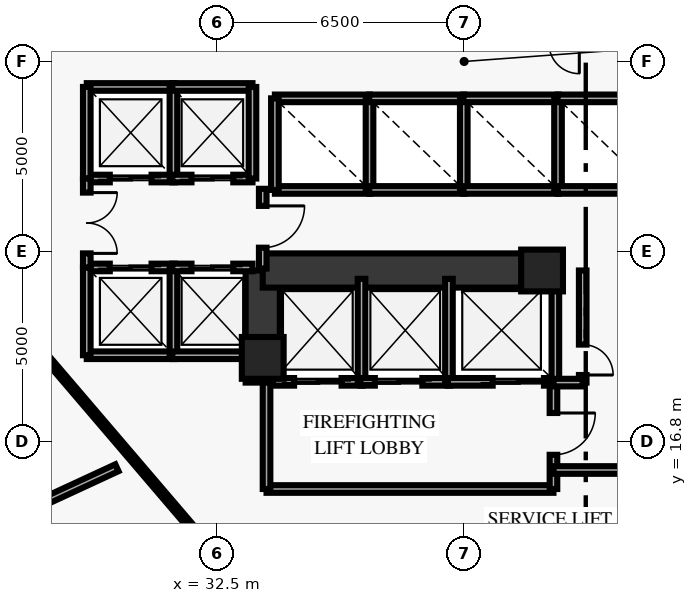
"""IFC4 building model, lengths in metres.
Left out: names, types, materials, properties, quantities, classifications, styles, units other than length and angle.
Written with IfcOpenShell. Run it as: python <this file> out.ifc"""

import sys

from ifc_helpers import new_model, si_unit, direction, frame, frame_2d, origin, origin_2d, place, context, subcontext, project, spatial, rectangle, extrude, element, fill, save


model = new_model("IFC4")
c1 = context("Model", 3, precision=1e-05, world=origin(), true_north=direction((0.0, 1.0)))
c2 = subcontext(c1, "Body", "Model", "MODEL_VIEW")
j1 = project(units=[si_unit("LENGTHUNIT", "METRE"), si_unit("PLANEANGLEUNIT", "RADIAN")], contexts=[c1])
p1 = place(None, origin())
s1 = spatial("IfcSite", under=j1, at=p1, CompositionType="ELEMENT")
p2 = place(p1, origin())
s2 = spatial("IfcBuilding", under=s1, at=p2, CompositionType="ELEMENT")
p3 = place(p2, frame((0.0, 0.0, 11.0)))
s3 = spatial("IfcBuildingStorey", under=s2, at=p3, CompositionType="ELEMENT", Elevation=11.0)
for number, where, z_axis, x_axis in (
    (1, (33.7, 19.0, 0.0), (0.0, 0.0, 1.0), (1.0, 0.0, 0.0)),
    (2, (41.05, 21.3, 0.0), (0.0, 0.0, 1.0), (1.0, 0.0, 0.0)),
):
    element("IfcColumn", number, at=place(p3, frame(where, z_axis=z_axis, x_axis=x_axis)), inside=s3, PredefinedType="PILASTER", context=c2, shape_type="SweptSolid", body=[
        extrude(rectangle(XDim=1.1, YDim=1.1, at=origin_2d()), origin(), (0.0, 0.0, 1.0), 4.7),
    ])
p4 = place(p3, frame((33.7, 18.35, 0.0), z_axis=(0.0, 0.0, 1.0), x_axis=(0.0, 1.0, 0.0)))
e3 = element("IfcWall", 3, at=p4, inside=s3, PredefinedType="SHEAR", context=c2, shape_type="SweptSolid", body=[
    extrude(rectangle(XDim=2.95, YDim=0.9, at=frame_2d((1.475, 0.0))), origin(), (0.0, 0.0, 1.0), 4.7),
])
p5 = place(p3, frame((33.7, 21.3, 0.0), z_axis=(0.0, 0.0, 1.0), x_axis=(1.0, 0.0, 0.0)))
e4 = element("IfcWall", 4, at=p5, inside=s3, PredefinedType="SHEAR", context=c2, shape_type="SweptSolid", body=[
    extrude(rectangle(XDim=7.55, YDim=0.9, at=frame_2d((3.775, 0.0))), origin(), (0.0, 0.0, 1.0), 4.7),
])
p6 = place(p3, frame((29.07, 23.72, 0.0), z_axis=(0.0, 0.0, 1.0), x_axis=(1.0, 0.0, 0.0)))
e5 = element("IfcWall", 5, at=p6, inside=s3, PredefinedType="SOLIDWALL", context=c2, shape_type="SweptSolid", body=[
    extrude(rectangle(XDim=2.31, YDim=0.2, at=frame_2d((1.155, 0.0))), origin(), (0.0, 0.0, 1.0), 4.7),
])
p7 = place(p6, frame((0.605, 0.0, 0.0)))
e6 = element("IfcOpeningElement", 6, at=p7, cuts=e5, PredefinedType="OPENING", context=c2, shape_type="SweptSolid", body=[
    extrude(rectangle(XDim=1.1, YDim=2.15, at=frame_2d((0.55, 1.075))), frame((0.0, 0.11, 0.0), z_axis=(0.0, -1.0, 0.0), x_axis=(1.0, 0.0, 0.0)), (0.0, 0.0, 1.0), 0.22),
])
p8 = place(p3, frame((29.07, 26.13, 0.0), z_axis=(0.0, 0.0, 1.0), x_axis=(1.0, 0.0, 0.0)))
e7 = element("IfcWall", 7, at=p8, inside=s3, PredefinedType="SOLIDWALL", context=c2, shape_type="SweptSolid", body=[
    extrude(rectangle(XDim=2.31, YDim=0.2, at=frame_2d((1.155, 0.0))), origin(), (0.0, 0.0, 1.0), 4.7),
])
for number, where, z_axis, x_axis in (
    (8, (29.07, 23.72, 0.0), (0.0, 0.0, 1.0), (0.0, 1.0, 0.0)),
    (9, (31.35, 23.72, 0.0), (0.0, 0.0, 1.0), (0.0, 1.0, 0.0)),
):
    element("IfcWall", number, at=place(p3, frame(where, z_axis=z_axis, x_axis=x_axis)), inside=s3, PredefinedType="SOLIDWALL", context=c2, shape_type="SweptSolid", body=[
        extrude(rectangle(XDim=2.41, YDim=0.2, at=frame_2d((1.205, 0.0))), origin(), (0.0, 0.0, 1.0), 4.7),
    ])
p9 = place(p3, frame((31.32, 23.72, 0.0), z_axis=(0.0, 0.0, 1.0), x_axis=(1.0, 0.0, 0.0)))
e10 = element("IfcWall", 10, at=p9, inside=s3, PredefinedType="SOLIDWALL", context=c2, shape_type="SweptSolid", body=[
    extrude(rectangle(XDim=2.11, YDim=0.2, at=frame_2d((1.055, 0.0))), origin(), (0.0, 0.0, 1.0), 4.7),
])
p10 = place(p9, frame((0.505, 0.0, 0.0)))
e11 = element("IfcOpeningElement", 11, at=p10, cuts=e10, PredefinedType="OPENING", context=c2, shape_type="SweptSolid", body=[
    extrude(rectangle(XDim=1.1, YDim=2.15, at=frame_2d((0.55, 1.075))), frame((0.0, 0.11, 0.0), z_axis=(0.0, -1.0, 0.0), x_axis=(1.0, 0.0, 0.0)), (0.0, 0.0, 1.0), 0.22),
])
p11 = place(p3, frame((31.32, 26.13, 0.0), z_axis=(0.0, 0.0, 1.0), x_axis=(1.0, 0.0, 0.0)))
e12 = element("IfcWall", 12, at=p11, inside=s3, PredefinedType="SOLIDWALL", context=c2, shape_type="SweptSolid", body=[
    extrude(rectangle(XDim=2.11, YDim=0.2, at=frame_2d((1.055, 0.0))), origin(), (0.0, 0.0, 1.0), 4.7),
])
p12 = place(p3, frame((33.43, 23.72, 0.0), z_axis=(0.0, 0.0, 1.0), x_axis=(0.0, 1.0, 0.0)))
e13 = element("IfcWall", 13, at=p12, inside=s3, PredefinedType="SOLIDWALL", context=c2, shape_type="SweptSolid", body=[
    extrude(rectangle(XDim=2.41, YDim=0.2, at=frame_2d((1.205, 0.0))), origin(), (0.0, 0.0, 1.0), 4.7),
])
p13 = place(p3, frame((29.07, 19.07, 0.0), z_axis=(0.0, 0.0, 1.0), x_axis=(1.0, 0.0, 0.0)))
e14 = element("IfcWall", 14, at=p13, inside=s3, PredefinedType="SOLIDWALL", context=c2, shape_type="SweptSolid", body=[
    extrude(rectangle(XDim=2.31, YDim=0.2, at=frame_2d((1.155, 0.0))), origin(), (0.0, 0.0, 1.0), 4.7),
])
p14 = place(p3, frame((29.07, 21.38, 0.0), z_axis=(0.0, 0.0, 1.0), x_axis=(1.0, 0.0, 0.0)))
e15 = element("IfcWall", 15, at=p14, inside=s3, PredefinedType="SOLIDWALL", context=c2, shape_type="SweptSolid", body=[
    extrude(rectangle(XDim=2.31, YDim=0.2, at=frame_2d((1.155, 0.0))), origin(), (0.0, 0.0, 1.0), 4.7),
])
p15 = place(p14, frame((0.605, 0.0, 0.0)))
e16 = element("IfcOpeningElement", 16, at=p15, cuts=e15, PredefinedType="OPENING", context=c2, shape_type="SweptSolid", body=[
    extrude(rectangle(XDim=1.1, YDim=2.15, at=frame_2d((0.55, 1.075))), frame((0.0, 0.11, 0.0), z_axis=(0.0, -1.0, 0.0), x_axis=(1.0, 0.0, 0.0)), (0.0, 0.0, 1.0), 0.22),
])
for number, where, z_axis, x_axis in (
    (17, (29.07, 19.07, 0.0), (0.0, 0.0, 1.0), (0.0, 1.0, 0.0)),
    (18, (31.35, 19.07, 0.0), (0.0, 0.0, 1.0), (0.0, 1.0, 0.0)),
):
    element("IfcWall", number, at=place(p3, frame(where, z_axis=z_axis, x_axis=x_axis)), inside=s3, PredefinedType="SOLIDWALL", context=c2, shape_type="SweptSolid", body=[
        extrude(rectangle(XDim=2.31, YDim=0.2, at=frame_2d((1.155, 0.0))), origin(), (0.0, 0.0, 1.0), 4.7),
    ])
p16 = place(p3, frame((31.32, 19.07, 0.0), z_axis=(0.0, 0.0, 1.0), x_axis=(1.0, 0.0, 0.0)))
e19 = element("IfcWall", 19, at=p16, inside=s3, PredefinedType="SOLIDWALL", context=c2, shape_type="SweptSolid", body=[
    extrude(rectangle(XDim=2.11, YDim=0.2, at=frame_2d((1.055, 0.0))), origin(), (0.0, 0.0, 1.0), 4.7),
])
p17 = place(p3, frame((31.32, 21.38, 0.0), z_axis=(0.0, 0.0, 1.0), x_axis=(1.0, 0.0, 0.0)))
e20 = element("IfcWall", 20, at=p17, inside=s3, PredefinedType="SOLIDWALL", context=c2, shape_type="SweptSolid", body=[
    extrude(rectangle(XDim=2.11, YDim=0.2, at=frame_2d((1.055, 0.0))), origin(), (0.0, 0.0, 1.0), 4.7),
])
p18 = place(p17, frame((0.505, 0.0, 0.0)))
e21 = element("IfcOpeningElement", 21, at=p18, cuts=e20, PredefinedType="OPENING", context=c2, shape_type="SweptSolid", body=[
    extrude(rectangle(XDim=1.1, YDim=2.15, at=frame_2d((0.55, 1.075))), frame((0.0, 0.11, 0.0), z_axis=(0.0, -1.0, 0.0), x_axis=(1.0, 0.0, 0.0)), (0.0, 0.0, 1.0), 0.22),
])
for number, where, z_axis, x_axis in (
    (22, (34.02, 23.42, 0.0), (0.0, 0.0, 1.0), (1.0, 0.0, 0.0)),
    (23, (34.02, 25.83, 0.0), (0.0, 0.0, 1.0), (1.0, 0.0, 0.0)),
):
    element("IfcWall", number, at=place(p3, frame(where, z_axis=z_axis, x_axis=x_axis)), inside=s3, PredefinedType="SOLIDWALL", context=c2, shape_type="SweptSolid", body=[
        extrude(rectangle(XDim=2.5, YDim=0.2, at=frame_2d((1.25, 0.0))), origin(), (0.0, 0.0, 1.0), 4.7),
    ])
for number, where, z_axis, x_axis in (
    (24, (34.02, 23.42, 0.0), (0.0, 0.0, 1.0), (0.0, 1.0, 0.0)),
    (25, (36.51, 23.42, 0.0), (0.0, 0.0, 1.0), (0.0, 1.0, 0.0)),
):
    element("IfcWall", number, at=place(p3, frame(where, z_axis=z_axis, x_axis=x_axis)), inside=s3, PredefinedType="SOLIDWALL", context=c2, shape_type="SweptSolid", body=[
        extrude(rectangle(XDim=2.41, YDim=0.2, at=frame_2d((1.205, 0.0))), origin(), (0.0, 0.0, 1.0), 4.7),
    ])
for number, where, z_axis, x_axis in (
    (26, (36.5, 23.42, 0.0), (0.0, 0.0, 1.0), (1.0, 0.0, 0.0)),
    (27, (36.5, 25.83, 0.0), (0.0, 0.0, 1.0), (1.0, 0.0, 0.0)),
):
    element("IfcWall", number, at=place(p3, frame(where, z_axis=z_axis, x_axis=x_axis)), inside=s3, PredefinedType="SOLIDWALL", context=c2, shape_type="SweptSolid", body=[
        extrude(rectangle(XDim=2.5, YDim=0.2, at=frame_2d((1.25, 0.0))), origin(), (0.0, 0.0, 1.0), 4.7),
    ])
p19 = place(p3, frame((38.99, 23.42, 0.0), z_axis=(0.0, 0.0, 1.0), x_axis=(0.0, 1.0, 0.0)))
e28 = element("IfcWall", 28, at=p19, inside=s3, PredefinedType="SOLIDWALL", context=c2, shape_type="SweptSolid", body=[
    extrude(rectangle(XDim=2.41, YDim=0.2, at=frame_2d((1.205, 0.0))), origin(), (0.0, 0.0, 1.0), 4.7),
])
for number, where, z_axis, x_axis in (
    (29, (38.98, 23.42, 0.0), (0.0, 0.0, 1.0), (1.0, 0.0, 0.0)),
    (30, (38.98, 25.83, 0.0), (0.0, 0.0, 1.0), (1.0, 0.0, 0.0)),
):
    element("IfcWall", number, at=place(p3, frame(where, z_axis=z_axis, x_axis=x_axis)), inside=s3, PredefinedType="SOLIDWALL", context=c2, shape_type="SweptSolid", body=[
        extrude(rectangle(XDim=2.5, YDim=0.2, at=frame_2d((1.25, 0.0))), origin(), (0.0, 0.0, 1.0), 4.7),
    ])
p20 = place(p3, frame((41.47, 23.42, 0.0), z_axis=(0.0, 0.0, 1.0), x_axis=(0.0, 1.0, 0.0)))
e31 = element("IfcWall", 31, at=p20, inside=s3, PredefinedType="SOLIDWALL", context=c2, shape_type="SweptSolid", body=[
    extrude(rectangle(XDim=2.41, YDim=0.2, at=frame_2d((1.205, 0.0))), origin(), (0.0, 0.0, 1.0), 4.7),
])
for number, where, z_axis, x_axis in (
    (32, (41.46, 23.42, 0.0), (0.0, 0.0, 1.0), (1.0, 0.0, 0.0)),
    (33, (41.46, 25.83, 0.0), (0.0, 0.0, 1.0), (1.0, 0.0, 0.0)),
):
    element("IfcWall", number, at=place(p3, frame(where, z_axis=z_axis, x_axis=x_axis)), inside=s3, PredefinedType="SOLIDWALL", context=c2, shape_type="SweptSolid", body=[
        extrude(rectangle(XDim=2.5, YDim=0.2, at=frame_2d((1.25, 0.0))), origin(), (0.0, 0.0, 1.0), 4.7),
    ])
p21 = place(p3, frame((33.97, 18.37, 0.0), z_axis=(0.0, 0.0, 1.0), x_axis=(1.0, 0.0, 0.0)))
e34 = element("IfcWall", 34, at=p21, inside=s3, PredefinedType="SOLIDWALL", context=c2, shape_type="SweptSolid", body=[
    extrude(rectangle(XDim=2.36, YDim=0.2, at=frame_2d((1.18, 0.0))), origin(), (0.0, 0.0, 1.0), 4.7),
])
p22 = place(p21, frame((0.555, 0.0, 0.0)))
e35 = element("IfcOpeningElement", 35, at=p22, cuts=e34, PredefinedType="OPENING", context=c2, shape_type="SweptSolid", body=[
    extrude(rectangle(XDim=1.25, YDim=2.2, at=frame_2d((0.625, 1.1))), frame((0.0, 0.11, 0.0), z_axis=(0.0, -1.0, 0.0), x_axis=(1.0, 0.0, 0.0)), (0.0, 0.0, 1.0), 0.22),
])
p23 = place(p3, frame((36.3, 18.37, 0.0), z_axis=(0.0, 0.0, 1.0), x_axis=(0.0, 1.0, 0.0)))
e36 = element("IfcWall", 36, at=p23, inside=s3, PredefinedType="SOLIDWALL", context=c2, shape_type="SweptSolid", body=[
    extrude(rectangle(XDim=2.71, YDim=0.2, at=frame_2d((1.355, 0.0))), origin(), (0.0, 0.0, 1.0), 4.7),
])
p24 = place(p3, frame((36.27, 18.37, 0.0), z_axis=(0.0, 0.0, 1.0), x_axis=(1.0, 0.0, 0.0)))
e37 = element("IfcWall", 37, at=p24, inside=s3, PredefinedType="SOLIDWALL", context=c2, shape_type="SweptSolid", body=[
    extrude(rectangle(XDim=2.36, YDim=0.2, at=frame_2d((1.18, 0.0))), origin(), (0.0, 0.0, 1.0), 4.7),
])
p25 = place(p24, frame((0.38, 0.0, 0.0)))
e38 = element("IfcOpeningElement", 38, at=p25, cuts=e37, PredefinedType="OPENING", context=c2, shape_type="SweptSolid", body=[
    extrude(rectangle(XDim=1.25, YDim=2.2, at=frame_2d((0.625, 1.1))), frame((0.0, 0.11, 0.0), z_axis=(0.0, -1.0, 0.0), x_axis=(1.0, 0.0, 0.0)), (0.0, 0.0, 1.0), 0.22),
])
p26 = place(p3, frame((38.6, 18.37, 0.0), z_axis=(0.0, 0.0, 1.0), x_axis=(0.0, 1.0, 0.0)))
e39 = element("IfcWall", 39, at=p26, inside=s3, PredefinedType="SOLIDWALL", context=c2, shape_type="SweptSolid", body=[
    extrude(rectangle(XDim=2.71, YDim=0.2, at=frame_2d((1.355, 0.0))), origin(), (0.0, 0.0, 1.0), 4.7),
])
p27 = place(p3, frame((38.57, 18.37, 0.0), z_axis=(0.0, 0.0, 1.0), x_axis=(1.0, 0.0, 0.0)))
e40 = element("IfcWall", 40, at=p27, inside=s3, PredefinedType="SOLIDWALL", context=c2, shape_type="SweptSolid", body=[
    extrude(rectangle(XDim=2.83, YDim=0.2, at=frame_2d((1.415, 0.0))), origin(), (0.0, 0.0, 1.0), 4.7),
])
p28 = place(p27, frame((1.18, 0.0, 0.0)))
e41 = element("IfcOpeningElement", 41, at=p28, cuts=e40, PredefinedType="OPENING", context=c2, shape_type="SweptSolid", body=[
    extrude(rectangle(XDim=1.35, YDim=2.18, at=frame_2d((0.675, 1.09))), frame((0.0, 0.11, 0.0), z_axis=(0.0, -1.0, 0.0), x_axis=(1.0, 0.0, 0.0)), (0.0, 0.0, 1.0), 0.22),
])
p29 = place(p3, frame((41.4, 18.37, 0.0), z_axis=(0.0, 0.0, 1.0), x_axis=(0.0, 1.0, 0.0)))
e42 = element("IfcWall", 42, at=p29, inside=s3, PredefinedType="SOLIDWALL", context=c2, shape_type="SweptSolid", body=[
    extrude(rectangle(XDim=2.71, YDim=0.2, at=frame_2d((1.355, 0.0))), origin(), (0.0, 0.0, 1.0), 4.7),
])
p30 = place(p3, frame((29.07, 21.38, 0.0), z_axis=(0.0, 0.0, 1.0), x_axis=(0.0, 1.0, 0.0)))
e43 = element("IfcWall", 43, at=p30, inside=s3, PredefinedType="SOLIDWALL", context=c2, shape_type="SweptSolid", body=[
    extrude(rectangle(XDim=2.34, YDim=0.2, at=frame_2d((1.17, 0.0))), origin(), (0.0, 0.0, 1.0), 4.7),
])
p31 = place(p30, frame((0.37, 0.0, 0.0)))
e44 = element("IfcOpeningElement", 44, at=p31, cuts=e43, PredefinedType="OPENING", context=c2, shape_type="SweptSolid", body=[
    extrude(rectangle(XDim=1.6, YDim=2.2, at=frame_2d((0.8, 1.1))), frame((0.0, 0.11, 0.0), z_axis=(0.0, -1.0, 0.0), x_axis=(1.0, 0.0, 0.0)), (0.0, 0.0, 1.0), 0.22),
])
p32 = place(p3, frame((33.7, 21.35, 0.0), z_axis=(0.0, 0.0, 1.0), x_axis=(0.0, 1.0, 0.0)))
e45 = element("IfcWall", 45, at=p32, inside=s3, PredefinedType="SOLIDWALL", context=c2, shape_type="SweptSolid", body=[
    extrude(rectangle(XDim=2.1, YDim=0.2, at=frame_2d((1.05, 0.0))), origin(), (0.0, 0.0, 1.0), 3.92),
])
p33 = place(p32, frame((0.55, 0.0, 0.0)))
e46 = element("IfcOpeningElement", 46, at=p33, cuts=e45, PredefinedType="OPENING", context=c2, shape_type="SweptSolid", body=[
    extrude(rectangle(XDim=1.1, YDim=2.15, at=frame_2d((0.55, 1.075))), frame((0.0, 0.11, 0.0), z_axis=(0.0, -1.0, 0.0), x_axis=(1.0, 0.0, 0.0)), (0.0, 0.0, 1.0), 0.22),
])
p34 = place(p3, frame((33.8, 15.55, 0.0), z_axis=(0.0, 0.0, 1.0), x_axis=(1.0, 0.0, 0.0)))
e47 = element("IfcWall", 47, at=p34, inside=s3, PredefinedType="SOLIDWALL", context=c2, shape_type="SweptSolid", body=[
    extrude(rectangle(XDim=7.55, YDim=0.2, at=frame_2d((3.775, 0.0))), origin(), (0.0, 0.0, 1.0), 4.7),
])
p35 = place(p3, frame((33.8, 15.55, 0.0), z_axis=(0.0, 0.0, 1.0), x_axis=(0.0, 1.0, 0.0)))
e48 = element("IfcWall", 48, at=p35, inside=s3, PredefinedType="SOLIDWALL", context=c2, shape_type="SweptSolid", body=[
    extrude(rectangle(XDim=2.8, YDim=0.2, at=frame_2d((1.4, 0.0))), origin(), (0.0, 0.0, 1.0), 4.7),
])
p36 = place(p3, frame((41.35, 15.55, 0.0), z_axis=(0.0, 0.0, 1.0), x_axis=(0.0, 1.0, 0.0)))
e49 = element("IfcWall", 49, at=p36, inside=s3, PredefinedType="SOLIDWALL", context=c2, shape_type="SweptSolid", body=[
    extrude(rectangle(XDim=2.8, YDim=0.2, at=frame_2d((1.4, 0.0))), origin(), (0.0, 0.0, 1.0), 4.7),
])
p37 = place(p36, frame((0.9, 0.0, 0.0)))
e50 = element("IfcOpeningElement", 50, at=p37, cuts=e49, PredefinedType="OPENING", context=c2, shape_type="SweptSolid", body=[
    extrude(rectangle(XDim=1.1, YDim=2.15, at=frame_2d((0.55, 1.075))), frame((0.0, 0.11, 0.0), z_axis=(0.0, -1.0, 0.0), x_axis=(1.0, 0.0, 0.0)), (0.0, 0.0, 1.0), 0.22),
])
p38 = place(p3, frame((41.35, 16.05, 0.0), z_axis=(0.0, 0.0, 1.0), x_axis=(1.0, 0.0, 0.0)))
e51 = element("IfcWall", 51, at=p38, inside=s3, PredefinedType="SOLIDWALL", context=c2, shape_type="SweptSolid", body=[
    extrude(rectangle(XDim=4.5, YDim=0.2, at=frame_2d((2.25, 0.0))), origin(), (0.0, 0.0, 1.0), 4.7),
])
p39 = place(p3, frame((42.12, 18.35, 0.0), z_axis=(0.0, 0.0, 1.0), x_axis=(0.0, 1.0, 0.0)))
e52 = element("IfcWall", 52, at=p39, inside=s3, PredefinedType="SOLIDWALL", context=c2, shape_type="SweptSolid", body=[
    extrude(rectangle(XDim=2.95, YDim=0.2, at=frame_2d((1.475, 0.0))), origin(), (0.0, 0.0, 1.0), 4.7),
])
p40 = place(p39, frame((0.2, 0.0, 0.0)))
e53 = element("IfcOpeningElement", 53, at=p40, cuts=e52, PredefinedType="OPENING", context=c2, shape_type="SweptSolid", body=[
    extrude(rectangle(XDim=0.8, YDim=2.05, at=frame_2d((0.4, 1.025))), frame((0.0, 0.11, 0.0), z_axis=(0.0, -1.0, 0.0), x_axis=(1.0, 0.0, 0.0)), (0.0, 0.0, 1.0), 0.22),
])
p41 = place(p3, frame((41.35, 18.35, 0.0), z_axis=(0.0, 0.0, 1.0), x_axis=(1.0, 0.0, 0.0)))
e54 = element("IfcWall", 54, at=p41, inside=s3, PredefinedType="SOLIDWALL", context=c2, shape_type="SweptSolid", body=[
    extrude(rectangle(XDim=0.77, YDim=0.2, at=frame_2d((0.385, 0.0))), origin(), (0.0, 0.0, 1.0), 4.7),
])
p42 = place(p3, frame((27.811, 19.24, 0.0), z_axis=(0.0, 0.0, 1.0), x_axis=(0.649652680018, -0.760231145998, 0.0)))
e55 = element("IfcWall", 55, at=p42, inside=s3, PredefinedType="PARTITIONING", context=c2, shape_type="SweptSolid", body=[
    extrude(rectangle(XDim=7.279, YDim=0.16, at=frame_2d((3.64, 0.0))), origin(), (0.0, 0.0, 1.0), 4.7),
])
p43 = place(p3, frame((29.864, 16.109, 0.0), z_axis=(0.0, 0.0, 1.0), x_axis=(-0.907520382507, -0.420008041988, 0.0)))
e56 = element("IfcWall", 56, at=p43, inside=s3, PredefinedType="PARTITIONING", context=c2, shape_type="SweptSolid", body=[
    extrude(rectangle(XDim=10.152, YDim=0.2, at=frame_2d((5.076, 0.0))), origin(), (0.0, 0.0, 1.0), 4.7),
])
p44 = place(p7, origin())
e57 = element("IfcDoor", 57, at=p44, inside=s3, OperationType="DOUBLE_DOOR_SLIDING", PredefinedType="DOOR", context=c2, shape_type="SweptSolid", body=[
    extrude(rectangle(XDim=1.1, YDim=2.15, at=frame_2d((0.55, 1.075))), frame((0.0, 0.025, 0.0), z_axis=(0.0, -1.0, 0.0), x_axis=(1.0, 0.0, 0.0)), (0.0, 0.0, 1.0), 0.05),
])
fill(e6, e57)
p45 = place(p10, origin())
e58 = element("IfcDoor", 58, at=p45, inside=s3, OperationType="DOUBLE_DOOR_SLIDING", PredefinedType="DOOR", context=c2, shape_type="SweptSolid", body=[
    extrude(rectangle(XDim=1.1, YDim=2.15, at=frame_2d((0.55, 1.075))), frame((0.0, 0.025, 0.0), z_axis=(0.0, -1.0, 0.0), x_axis=(1.0, 0.0, 0.0)), (0.0, 0.0, 1.0), 0.05),
])
fill(e11, e58)
p46 = place(p15, origin())
e59 = element("IfcDoor", 59, at=p46, inside=s3, OperationType="DOUBLE_DOOR_SLIDING", PredefinedType="DOOR", context=c2, shape_type="SweptSolid", body=[
    extrude(rectangle(XDim=1.1, YDim=2.15, at=frame_2d((0.55, 1.075))), frame((0.0, 0.025, 0.0), z_axis=(0.0, -1.0, 0.0), x_axis=(1.0, 0.0, 0.0)), (0.0, 0.0, 1.0), 0.05),
])
fill(e16, e59)
p47 = place(p18, origin())
e60 = element("IfcDoor", 60, at=p47, inside=s3, OperationType="DOUBLE_DOOR_SLIDING", PredefinedType="DOOR", context=c2, shape_type="SweptSolid", body=[
    extrude(rectangle(XDim=1.1, YDim=2.15, at=frame_2d((0.55, 1.075))), frame((0.0, 0.025, 0.0), z_axis=(0.0, -1.0, 0.0), x_axis=(1.0, 0.0, 0.0)), (0.0, 0.0, 1.0), 0.05),
])
fill(e21, e60)
p48 = place(p22, origin())
e61 = element("IfcDoor", 61, at=p48, inside=s3, OperationType="DOUBLE_DOOR_SLIDING", PredefinedType="DOOR", context=c2, shape_type="SweptSolid", body=[
    extrude(rectangle(XDim=1.25, YDim=2.2, at=frame_2d((0.625, 1.1))), frame((0.0, 0.025, 0.0), z_axis=(0.0, -1.0, 0.0), x_axis=(1.0, 0.0, 0.0)), (0.0, 0.0, 1.0), 0.05),
])
fill(e35, e61)
p49 = place(p25, origin())
e62 = element("IfcDoor", 62, at=p49, inside=s3, OperationType="DOUBLE_DOOR_SLIDING", PredefinedType="DOOR", context=c2, shape_type="SweptSolid", body=[
    extrude(rectangle(XDim=1.25, YDim=2.2, at=frame_2d((0.625, 1.1))), frame((0.0, 0.025, 0.0), z_axis=(0.0, -1.0, 0.0), x_axis=(1.0, 0.0, 0.0)), (0.0, 0.0, 1.0), 0.05),
])
fill(e38, e62)
p50 = place(p28, origin())
e63 = element("IfcDoor", 63, at=p50, inside=s3, OperationType="DOUBLE_DOOR_SLIDING", PredefinedType="DOOR", context=c2, shape_type="SweptSolid", body=[
    extrude(rectangle(XDim=1.35, YDim=2.18, at=frame_2d((0.675, 1.09))), frame((0.0, 0.025, 0.0), z_axis=(0.0, -1.0, 0.0), x_axis=(1.0, 0.0, 0.0)), (0.0, 0.0, 1.0), 0.05),
])
fill(e41, e63)
p51 = place(p31, origin())
e64 = element("IfcDoor", 64, at=p51, inside=s3, OperationType="DOUBLE_DOOR_SINGLE_SWING", PredefinedType="DOOR", context=c2, shape_type="SweptSolid", body=[
    extrude(rectangle(XDim=1.6, YDim=2.2, at=frame_2d((0.8, 1.1))), frame((0.0, 0.025, 0.0), z_axis=(0.0, -1.0, 0.0), x_axis=(1.0, 0.0, 0.0)), (0.0, 0.0, 1.0), 0.05),
])
fill(e44, e64)
p52 = place(p33, origin())
e65 = element("IfcDoor", 65, at=p52, inside=s3, OperationType="SINGLE_SWING_RIGHT", PredefinedType="DOOR", context=c2, shape_type="SweptSolid", body=[
    extrude(rectangle(XDim=1.1, YDim=2.15, at=frame_2d((0.55, 1.075))), frame((0.0, 0.025, 0.0), z_axis=(0.0, -1.0, 0.0), x_axis=(1.0, 0.0, 0.0)), (0.0, 0.0, 1.0), 0.05),
])
fill(e46, e65)
p53 = place(p37, origin())
e66 = element("IfcDoor", 66, at=p53, inside=s3, OperationType="SINGLE_SWING_RIGHT", PredefinedType="DOOR", context=c2, shape_type="SweptSolid", body=[
    extrude(rectangle(XDim=1.1, YDim=2.15, at=frame_2d((0.55, 1.075))), frame((0.0, 0.025, 0.0), z_axis=(0.0, -1.0, 0.0), x_axis=(1.0, 0.0, 0.0)), (0.0, 0.0, 1.0), 0.05),
])
fill(e50, e66)
p54 = place(p40, origin())
e67 = element("IfcDoor", 67, at=p54, inside=s3, OperationType="SINGLE_SWING_LEFT", PredefinedType="DOOR", context=c2, shape_type="SweptSolid", body=[
    extrude(rectangle(XDim=0.8, YDim=2.05, at=frame_2d((0.4, 1.025))), frame((0.0, 0.025, 0.0), z_axis=(0.0, -1.0, 0.0), x_axis=(1.0, 0.0, 0.0)), (0.0, 0.0, 1.0), 0.05),
])
fill(e53, e67)
save(model, sys.argv[1])
